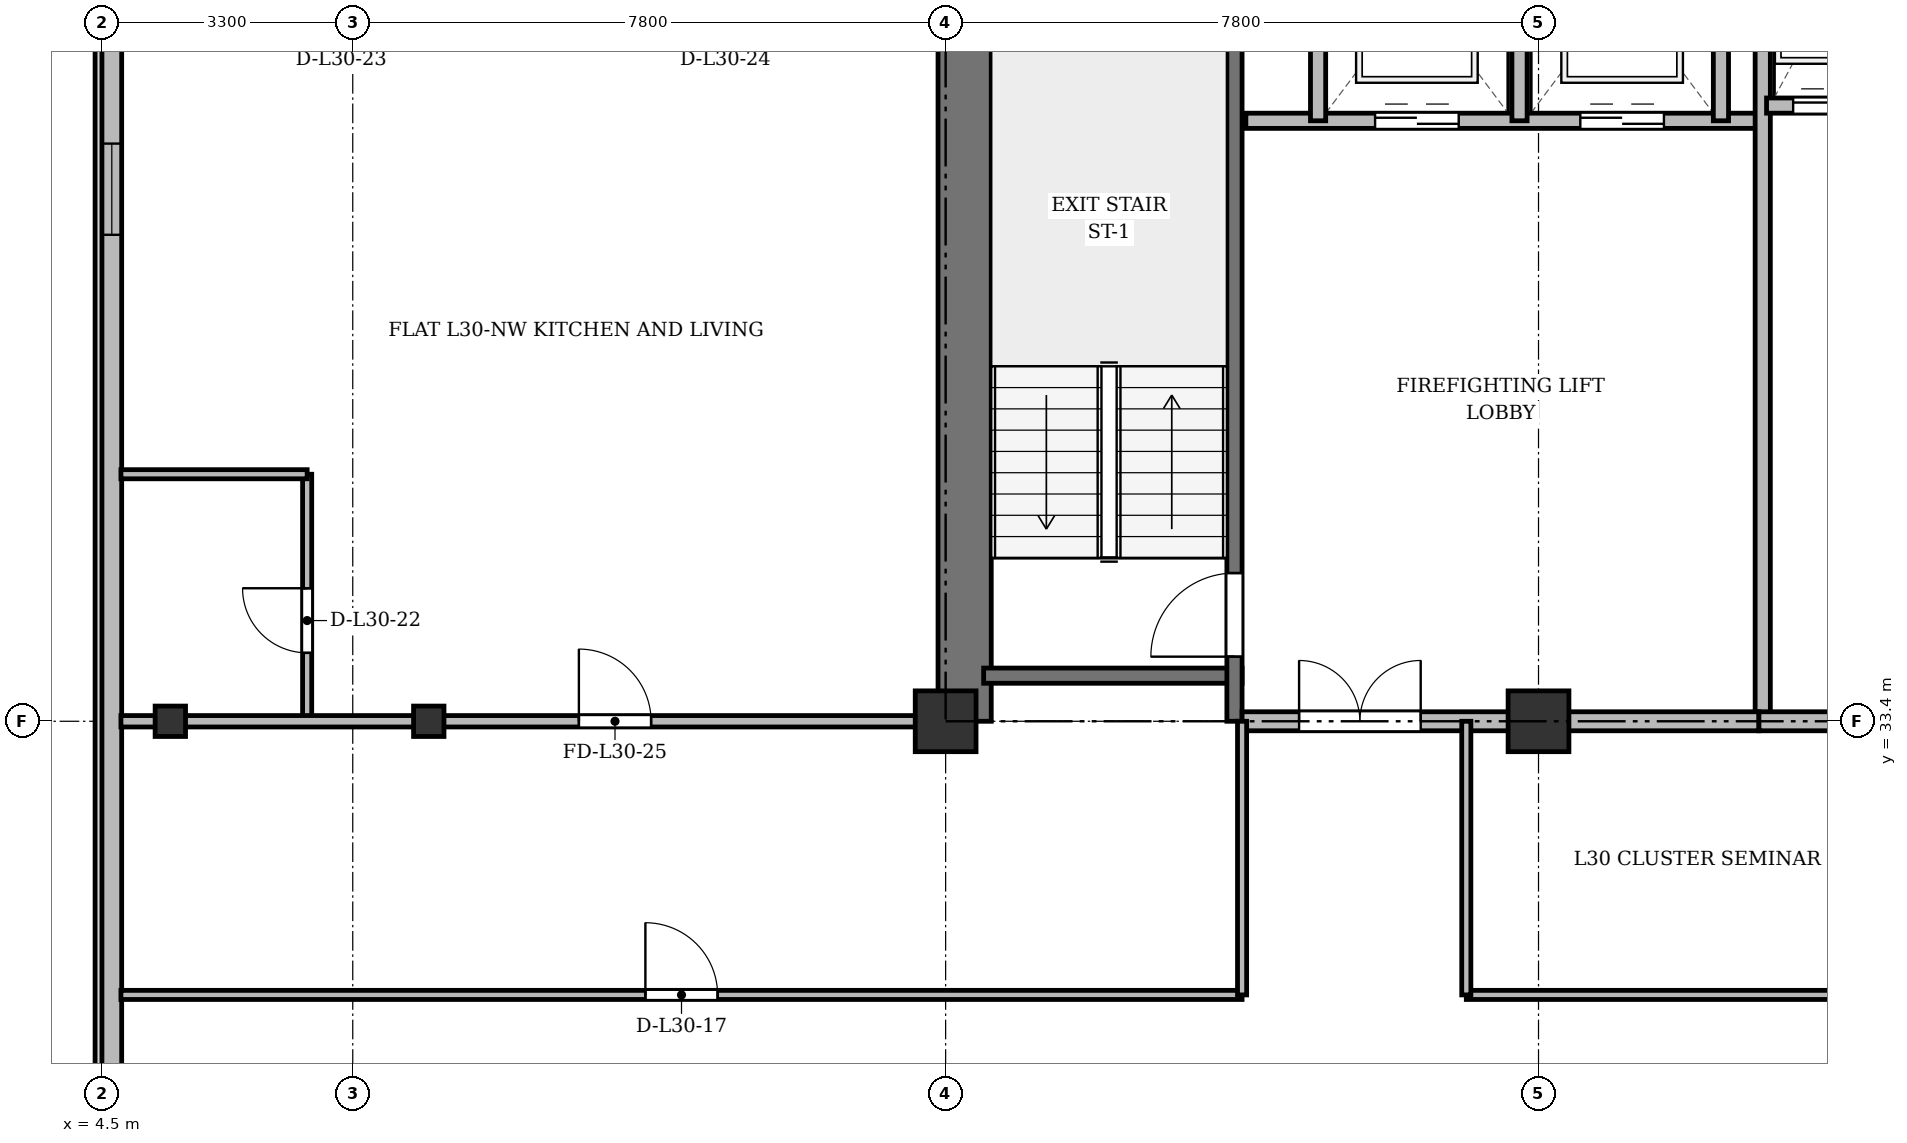
"""IFC4 building model, lengths in metres.
Left out: names, types, materials, properties, quantities, classifications, styles, units other than length and angle.
Written with IfcOpenShell. Run it as: python <this file> out.ifc"""

import sys

from ifc_helpers import new_model, si_unit, direction, frame, frame_2d, origin, origin_2d, place, context, subcontext, project, spatial, rectangle, i_section, extrude, source, transform, mapped, element, fill, save


model = new_model("IFC4")
c1 = context("Model", 3, precision=1e-05, world=origin(), true_north=direction((0.0, 1.0)))
c2 = subcontext(c1, "Body", "Model", "MODEL_VIEW")
j1 = project(units=[si_unit("LENGTHUNIT", "METRE"), si_unit("PLANEANGLEUNIT", "RADIAN")], contexts=[c1])
p1 = place(None, origin())
s1 = spatial("IfcSite", under=j1, at=p1, CompositionType="ELEMENT")
p2 = place(p1, origin())
s2 = spatial("IfcBuilding", under=s1, at=p2, CompositionType="ELEMENT")
p3 = place(p2, frame((0.0, 0.0, 117.7)))
s3 = spatial("IfcBuildingStorey", under=s2, at=p3, CompositionType="ELEMENT", Elevation=117.7)
m1 = source(origin(), c2, "Body", "SweptSolid", [
    extrude(i_section(OverallWidth=0.4, OverallDepth=0.4, WebThickness=0.022, FlangeThickness=0.035, at=origin_2d()), origin(), (0.0, 0.0, 1.0), 3.6),
])
for number, where, z_axis, x_axis in (
    (1, (5.4, 33.4, 0.0), (0.0, 0.0, 1.0), (1.0, 0.0, 0.0)),
    (2, (8.8, 33.4, 0.0), (0.0, 0.0, 1.0), (1.0, 0.0, 0.0)),
):
    element("IfcColumn", number, at=place(p3, frame(where, z_axis=z_axis, x_axis=x_axis)), inside=s3, PredefinedType="COLUMN", context=c2, shape_type="MappedRepresentation", body=[
        mapped(m1, transform((0.0, 0.0, 0.0), x_axis=(1.0, 0.0, 0.0), y_axis=(0.0, 1.0, 0.0), z_axis=(0.0, 0.0, 1.0), scale=1.0)),
    ])
m2 = source(origin(), c2, "Body", "SweptSolid", [
    extrude(rectangle(XDim=0.8, YDim=0.8, at=origin_2d()), origin(), (0.0, 0.0, 1.0), 3.6),
])
for number, where, z_axis, x_axis in (
    (3, (15.6, 33.4, 0.0), (0.0, 0.0, 1.0), (1.0, 0.0, 0.0)),
    (4, (23.4, 33.4, 0.0), (0.0, 0.0, 1.0), (1.0, 0.0, 0.0)),
):
    element("IfcColumn", number, at=place(p3, frame(where, z_axis=z_axis, x_axis=x_axis)), inside=s3, PredefinedType="COLUMN", context=c2, shape_type="MappedRepresentation", body=[
        mapped(m2, transform((0.0, 0.0, 0.0), x_axis=(1.0, 0.0, 0.0), y_axis=(0.0, 1.0, 0.0), z_axis=(0.0, 0.0, 1.0), scale=1.0)),
    ])
p4 = place(p3, frame((4.63, 5.9, 0.0), z_axis=(0.0, 0.0, 1.0), x_axis=(0.0, 1.0, 0.0)))
e5 = element("IfcWall", 5, at=p4, inside=s3, PredefinedType="SOLIDWALL", context=c2, shape_type="SweptSolid", body=[
    extrude(rectangle(XDim=39.6, YDim=0.26, at=frame_2d((19.8, 0.0))), origin(), (0.0, 0.0, 1.0), 3.34),
])
p5 = place(p4, frame((1.45, 0.0, 0.92)))
e6 = element("IfcOpeningElement", 6, at=p5, cuts=e5, PredefinedType="OPENING", context=c2, shape_type="SweptSolid", body=[
    extrude(rectangle(XDim=1.2, YDim=1.65, at=frame_2d((0.6, 0.825))), frame((0.0, 0.14, 0.0), z_axis=(0.0, -1.0, 0.0), x_axis=(1.0, 0.0, 0.0)), (0.0, 0.0, 1.0), 0.28),
])
p6 = place(p4, frame((4.2, 0.0, 0.92)))
e7 = element("IfcOpeningElement", 7, at=p6, cuts=e5, PredefinedType="OPENING", context=c2, shape_type="SweptSolid", body=[
    extrude(rectangle(XDim=2.6, YDim=1.9, at=frame_2d((1.3, 0.95))), frame((0.0, 0.14, 0.0), z_axis=(0.0, -1.0, 0.0), x_axis=(1.0, 0.0, 0.0)), (0.0, 0.0, 1.0), 0.28),
])
p7 = place(p4, frame((8.4, 0.0, 0.92)))
e8 = element("IfcOpeningElement", 8, at=p7, cuts=e5, PredefinedType="OPENING", context=c2, shape_type="SweptSolid", body=[
    extrude(rectangle(XDim=2.6, YDim=1.9, at=frame_2d((1.3, 0.95))), frame((0.0, 0.14, 0.0), z_axis=(0.0, -1.0, 0.0), x_axis=(1.0, 0.0, 0.0)), (0.0, 0.0, 1.0), 0.28),
])
p8 = place(p4, frame((15.6, 0.0, 0.92)))
e9 = element("IfcOpeningElement", 9, at=p8, cuts=e5, PredefinedType="OPENING", context=c2, shape_type="SweptSolid", body=[
    extrude(rectangle(XDim=2.6, YDim=1.9, at=frame_2d((1.3, 0.95))), frame((0.0, 0.14, 0.0), z_axis=(0.0, -1.0, 0.0), x_axis=(1.0, 0.0, 0.0)), (0.0, 0.0, 1.0), 0.28),
])
p9 = place(p4, frame((33.9, 0.0, 0.92)))
e10 = element("IfcOpeningElement", 10, at=p9, cuts=e5, PredefinedType="OPENING", context=c2, shape_type="SweptSolid", body=[
    extrude(rectangle(XDim=1.2, YDim=1.65, at=frame_2d((0.6, 0.825))), frame((0.0, 0.14, 0.0), z_axis=(0.0, -1.0, 0.0), x_axis=(1.0, 0.0, 0.0)), (0.0, 0.0, 1.0), 0.28),
])
p10 = place(p4, frame((37.25, 0.0, 0.92)))
e11 = element("IfcOpeningElement", 11, at=p10, cuts=e5, PredefinedType="OPENING", context=c2, shape_type="SweptSolid", body=[
    extrude(rectangle(XDim=1.2, YDim=1.65, at=frame_2d((0.6, 0.825))), frame((0.0, 0.14, 0.0), z_axis=(0.0, -1.0, 0.0), x_axis=(1.0, 0.0, 0.0)), (0.0, 0.0, 1.0), 0.28),
])
p11 = place(p3, frame((15.85, 33.4, 0.0), z_axis=(0.0, 0.0, 1.0), x_axis=(0.0, 1.0, 0.0)))
e12 = element("IfcWall", 12, at=p11, inside=s3, PredefinedType="SHEAR", context=c2, shape_type="SweptSolid", body=[
    extrude(rectangle(XDim=11.7, YDim=0.7, at=frame_2d((5.85, 0.0))), origin(), (0.0, 0.0, 1.0), 3.34),
])
p12 = place(p3, frame((16.1, 34.0, 0.0), z_axis=(0.0, 0.0, 1.0), x_axis=(1.0, 0.0, 0.0)))
e13 = element("IfcWall", 13, at=p12, inside=s3, PredefinedType="SHEAR", context=c2, shape_type="SweptSolid", body=[
    extrude(rectangle(XDim=3.4, YDim=0.2, at=frame_2d((1.7, 0.0))), origin(), (0.0, 0.0, 1.0), 3.34),
])
p13 = place(p3, frame((19.4, 33.4, 0.0), z_axis=(0.0, 0.0, 1.0), x_axis=(0.0, 1.0, 0.0)))
e14 = element("IfcWall", 14, at=p13, inside=s3, PredefinedType="SHEAR", context=c2, shape_type="SweptSolid", body=[
    extrude(rectangle(XDim=11.1, YDim=0.2, at=frame_2d((5.55, 0.0))), origin(), (0.0, 0.0, 1.0), 3.34),
])
p14 = place(p13, frame((0.85, 0.0, 0.0)))
e15 = element("IfcOpeningElement", 15, at=p14, cuts=e14, PredefinedType="OPENING", context=c2, shape_type="SweptSolid", body=[
    extrude(rectangle(XDim=1.1, YDim=2.15, at=frame_2d((0.55, 1.075))), frame((0.0, 0.11, 0.0), z_axis=(0.0, -1.0, 0.0), x_axis=(1.0, 0.0, 0.0)), (0.0, 0.0, 1.0), 0.22),
])
p15 = place(p3, frame((19.55, 41.3, 0.0), z_axis=(0.0, 0.0, 1.0), x_axis=(1.0, 0.0, 0.0)))
e16 = element("IfcWall", 16, at=p15, inside=s3, PredefinedType="SOLIDWALL", context=c2, shape_type="SweptSolid", body=[
    extrude(rectangle(XDim=6.75, YDim=0.2, at=frame_2d((3.375, 0.0))), origin(), (0.0, 0.0, 1.0), 3.34),
])
p16 = place(p15, frame((1.7, 0.0, 0.0)))
e17 = element("IfcOpeningElement", 17, at=p16, cuts=e16, PredefinedType="OPENING", context=c2, shape_type="SweptSolid", body=[
    extrude(rectangle(XDim=1.1, YDim=2.15, at=frame_2d((0.55, 1.075))), frame((0.0, 0.11, 0.0), z_axis=(0.0, -1.0, 0.0), x_axis=(1.0, 0.0, 0.0)), (0.0, 0.0, 1.0), 0.22),
])
p17 = place(p15, frame((4.4, 0.0, 0.0)))
e18 = element("IfcOpeningElement", 18, at=p17, cuts=e16, PredefinedType="OPENING", context=c2, shape_type="SweptSolid", body=[
    extrude(rectangle(XDim=1.1, YDim=2.15, at=frame_2d((0.55, 1.075))), frame((0.0, 0.11, 0.0), z_axis=(0.0, -1.0, 0.0), x_axis=(1.0, 0.0, 0.0)), (0.0, 0.0, 1.0), 0.22),
])
for number, where, z_axis, x_axis in (
    (19, (20.5, 41.3, 0.0), (0.0, 0.0, 1.0), (0.0, 1.0, 0.0)),
    (20, (23.15, 41.3, 0.0), (0.0, 0.0, 1.0), (0.0, 1.0, 0.0)),
    (21, (25.8, 41.3, 0.0), (0.0, 0.0, 1.0), (0.0, 1.0, 0.0)),
):
    element("IfcWall", number, at=place(p3, frame(where, z_axis=z_axis, x_axis=x_axis)), inside=s3, PredefinedType="SOLIDWALL", context=c2, shape_type="SweptSolid", body=[
        extrude(rectangle(XDim=3.4, YDim=0.2, at=frame_2d((1.7, 0.0))), origin(), (0.0, 0.0, 1.0), 3.34),
    ])
p18 = place(p3, frame((26.35, 33.4, 0.0), z_axis=(0.0, 0.0, 1.0), x_axis=(0.0, 1.0, 0.0)))
e22 = element("IfcWall", 22, at=p18, inside=s3, PredefinedType="SOLIDWALL", context=c2, shape_type="SweptSolid", body=[
    extrude(rectangle(XDim=11.3, YDim=0.2, at=frame_2d((5.65, 0.0))), origin(), (0.0, 0.0, 1.0), 2.752),
])
p19 = place(p3, frame((19.5, 33.4, 0.0), z_axis=(0.0, 0.0, 1.0), x_axis=(1.0, 0.0, 0.0)))
e23 = element("IfcWall", 23, at=p19, inside=s3, PredefinedType="PARTITIONING", context=c2, shape_type="SweptSolid", body=[
    extrude(rectangle(XDim=6.8, YDim=0.25, at=frame_2d((3.4, 0.0))), origin(), (0.0, 0.0, 1.0), 2.752),
])
p20 = place(p19, frame((0.75, 0.0, 0.0)))
e24 = element("IfcOpeningElement", 24, at=p20, cuts=e23, PredefinedType="OPENING", context=c2, shape_type="SweptSolid", body=[
    extrude(rectangle(XDim=1.6, YDim=2.2, at=frame_2d((0.8, 1.1))), frame((0.0, 0.135, 0.0), z_axis=(0.0, -1.0, 0.0), x_axis=(1.0, 0.0, 0.0)), (0.0, 0.0, 1.0), 0.27),
])
p21 = place(p3, frame((26.4, 41.5, 0.0), z_axis=(0.0, 0.0, 1.0), x_axis=(1.0, 0.0, 0.0)))
e25 = element("IfcWall", 25, at=p21, inside=s3, PredefinedType="SOLIDWALL", context=c2, shape_type="SweptSolid", body=[
    extrude(rectangle(XDim=6.95, YDim=0.2, at=frame_2d((3.475, 0.0))), origin(), (0.0, 0.0, 1.0), 3.34),
])
p22 = place(p21, frame((0.35, 0.0, 0.0)))
e26 = element("IfcOpeningElement", 26, at=p22, cuts=e25, PredefinedType="OPENING", context=c2, shape_type="SweptSolid", body=[
    extrude(rectangle(XDim=1.05, YDim=2.15, at=frame_2d((0.525, 1.075))), frame((0.0, 0.11, 0.0), z_axis=(0.0, -1.0, 0.0), x_axis=(1.0, 0.0, 0.0)), (0.0, 0.0, 1.0), 0.22),
])
p23 = place(p21, frame((2.05, 0.0, 0.0)))
e27 = element("IfcOpeningElement", 27, at=p23, cuts=e25, PredefinedType="OPENING", context=c2, shape_type="SweptSolid", body=[
    extrude(rectangle(XDim=1.05, YDim=2.15, at=frame_2d((0.525, 1.075))), frame((0.0, 0.11, 0.0), z_axis=(0.0, -1.0, 0.0), x_axis=(1.0, 0.0, 0.0)), (0.0, 0.0, 1.0), 0.22),
])
p24 = place(p21, frame((3.75, 0.0, 0.0)))
e28 = element("IfcOpeningElement", 28, at=p24, cuts=e25, PredefinedType="OPENING", context=c2, shape_type="SweptSolid", body=[
    extrude(rectangle(XDim=1.05, YDim=2.15, at=frame_2d((0.525, 1.075))), frame((0.0, 0.11, 0.0), z_axis=(0.0, -1.0, 0.0), x_axis=(1.0, 0.0, 0.0)), (0.0, 0.0, 1.0), 0.22),
])
p25 = place(p21, frame((5.45, 0.0, 0.0)))
e29 = element("IfcOpeningElement", 29, at=p25, cuts=e25, PredefinedType="OPENING", context=c2, shape_type="SweptSolid", body=[
    extrude(rectangle(XDim=1.05, YDim=2.15, at=frame_2d((0.525, 1.075))), frame((0.0, 0.11, 0.0), z_axis=(0.0, -1.0, 0.0), x_axis=(1.0, 0.0, 0.0)), (0.0, 0.0, 1.0), 0.22),
])
p26 = place(p3, frame((26.3, 33.4, 0.0), z_axis=(0.0, 0.0, 1.0), x_axis=(1.0, 0.0, 0.0)))
e30 = element("IfcWall", 30, at=p26, inside=s3, PredefinedType="PARTITIONING", context=c2, shape_type="SweptSolid", body=[
    extrude(rectangle(XDim=20.85, YDim=0.25, at=frame_2d((10.425, 0.0))), origin(), (0.0, 0.0, 1.0), 2.752),
])
p27 = place(p26, frame((9.2, 0.0, 0.0)))
e31 = element("IfcOpeningElement", 31, at=p27, cuts=e30, PredefinedType="OPENING", context=c2, shape_type="SweptSolid", body=[
    extrude(rectangle(XDim=1.6, YDim=2.2, at=frame_2d((0.8, 1.1))), frame((0.0, 0.135, 0.0), z_axis=(0.0, -1.0, 0.0), x_axis=(1.0, 0.0, 0.0)), (0.0, 0.0, 1.0), 0.27),
])
p28 = place(p3, frame((4.75, 29.8, 0.0), z_axis=(0.0, 0.0, 1.0), x_axis=(1.0, 0.0, 0.0)))
e32 = element("IfcWall", 32, at=p28, inside=s3, PredefinedType="PARTITIONING", context=c2, shape_type="SweptSolid", body=[
    extrude(rectangle(XDim=14.75, YDim=0.12, at=frame_2d((7.375, 0.0))), origin(), (0.0, 0.0, 1.0), 2.84),
])
p29 = place(p28, frame((6.9, 0.0, 0.0)))
e33 = element("IfcOpeningElement", 33, at=p29, cuts=e32, PredefinedType="OPENING", context=c2, shape_type="SweptSolid", body=[
    extrude(rectangle(XDim=0.95, YDim=2.15, at=frame_2d((0.475, 1.075))), frame((0.0, 0.07, 0.0), z_axis=(0.0, -1.0, 0.0), x_axis=(1.0, 0.0, 0.0)), (0.0, 0.0, 1.0), 0.14),
])
p30 = place(p3, frame((22.45, 29.8, 0.0), z_axis=(0.0, 0.0, 1.0), x_axis=(1.0, 0.0, 0.0)))
e34 = element("IfcWall", 34, at=p30, inside=s3, PredefinedType="PARTITIONING", context=c2, shape_type="SweptSolid", body=[
    extrude(rectangle(XDim=11.75, YDim=0.12, at=frame_2d((5.875, 0.0))), origin(), (0.0, 0.0, 1.0), 2.84),
])
p31 = place(p30, frame((4.944, 0.0, 0.0)))
e35 = element("IfcOpeningElement", 35, at=p31, cuts=e34, PredefinedType="OPENING", context=c2, shape_type="SweptSolid", body=[
    extrude(rectangle(XDim=0.95, YDim=2.15, at=frame_2d((0.475, 1.075))), frame((0.0, 0.07, 0.0), z_axis=(0.0, -1.0, 0.0), x_axis=(1.0, 0.0, 0.0)), (0.0, 0.0, 1.0), 0.14),
])
for number, where, z_axis, x_axis in (
    (36, (19.5, 29.8, 0.0), (0.0, 0.0, 1.0), (0.0, 1.0, 0.0)),
    (37, (22.45, 29.8, 0.0), (0.0, 0.0, 1.0), (0.0, 1.0, 0.0)),
):
    element("IfcWall", number, at=place(p3, frame(where, z_axis=z_axis, x_axis=x_axis)), inside=s3, PredefinedType="PARTITIONING", context=c2, shape_type="SweptSolid", body=[
        extrude(rectangle(XDim=3.6, YDim=0.12, at=frame_2d((1.8, 0.0))), origin(), (0.0, 0.0, 1.0), 2.752),
    ])
p32 = place(p3, frame((7.2, 33.4, 0.0), z_axis=(0.0, 0.0, 1.0), x_axis=(0.0, 1.0, 0.0)))
e38 = element("IfcWall", 38, at=p32, inside=s3, PredefinedType="PARTITIONING", context=c2, shape_type="SweptSolid", body=[
    extrude(rectangle(XDim=3.25, YDim=0.12, at=frame_2d((1.625, 0.0))), origin(), (0.0, 0.0, 1.0), 2.752),
])
p33 = place(p32, frame((0.9, 0.0, 0.0)))
e39 = element("IfcOpeningElement", 39, at=p33, cuts=e38, PredefinedType="OPENING", context=c2, shape_type="SweptSolid", body=[
    extrude(rectangle(XDim=0.85, YDim=2.1, at=frame_2d((0.425, 1.05))), frame((0.0, 0.07, 0.0), z_axis=(0.0, -1.0, 0.0), x_axis=(1.0, 0.0, 0.0)), (0.0, 0.0, 1.0), 0.14),
])
p34 = place(p3, frame((4.75, 36.65, 0.0), z_axis=(0.0, 0.0, 1.0), x_axis=(1.0, 0.0, 0.0)))
e40 = element("IfcWall", 40, at=p34, inside=s3, PredefinedType="PARTITIONING", context=c2, shape_type="SweptSolid", body=[
    extrude(rectangle(XDim=2.45, YDim=0.12, at=frame_2d((1.225, 0.0))), origin(), (0.0, 0.0, 1.0), 2.84),
])
p35 = place(p3, frame((4.75, 33.4, 0.0), z_axis=(0.0, 0.0, 1.0), x_axis=(1.0, 0.0, 0.0)))
e41 = element("IfcWall", 41, at=p35, inside=s3, PredefinedType="PARTITIONING", context=c2, shape_type="SweptSolid", body=[
    extrude(rectangle(XDim=10.85, YDim=0.15, at=frame_2d((5.425, 0.0))), origin(), (0.0, 0.0, 1.0), 2.752),
])
p36 = place(p35, frame((6.025, 0.0, 0.0)))
e42 = element("IfcOpeningElement", 42, at=p36, cuts=e41, PredefinedType="OPENING", context=c2, shape_type="SweptSolid", body=[
    extrude(rectangle(XDim=0.95, YDim=2.15, at=frame_2d((0.475, 1.075))), frame((0.0, 0.085, 0.0), z_axis=(0.0, -1.0, 0.0), x_axis=(1.0, 0.0, 0.0)), (0.0, 0.0, 1.0), 0.17),
])
m3 = source(origin(), c2, "Body", "SweptSolid", [
    extrude(rectangle(XDim=1.2, YDim=1.65, at=frame_2d((0.6, 0.825))), frame((0.0, 0.03, 0.0), z_axis=(0.0, -1.0, 0.0), x_axis=(1.0, 0.0, 0.0)), (0.0, 0.0, 1.0), 0.06),
])
p37 = place(p9, origin())
e43 = element("IfcWindow", 43, at=p37, inside=s3, PartitioningType="SINGLE_PANEL", PredefinedType="WINDOW", context=c2, shape_type="MappedRepresentation", body=[
    mapped(m3, transform((0.0, 0.0, 0.0), x_axis=(1.0, 0.0, 0.0), y_axis=(0.0, 1.0, 0.0), z_axis=(0.0, 0.0, 1.0), scale=1.0)),
])
fill(e10, e43)
m4 = source(origin(), c2, "Body", "SweptSolid", [
    extrude(rectangle(XDim=1.1, YDim=2.15, at=frame_2d((0.55, 1.075))), frame((0.0, 0.025, 0.0), z_axis=(0.0, -1.0, 0.0), x_axis=(1.0, 0.0, 0.0)), (0.0, 0.0, 1.0), 0.05),
])
p38 = place(p14, origin())
e44 = element("IfcDoor", 44, at=p38, inside=s3, OperationType="SINGLE_SWING_LEFT", PredefinedType="DOOR", context=c2, shape_type="MappedRepresentation", body=[
    mapped(m4, transform((0.0, 0.0, 0.0), x_axis=(1.0, 0.0, 0.0), y_axis=(0.0, 1.0, 0.0), z_axis=(0.0, 0.0, 1.0), scale=1.0)),
])
fill(e15, e44)
p39 = place(p16, origin())
e45 = element("IfcDoor", 45, at=p39, inside=s3, OperationType="DOUBLE_DOOR_SLIDING", PredefinedType="DOOR", context=c2, shape_type="MappedRepresentation", body=[
    mapped(m4, transform((0.0, 0.0, 0.0), x_axis=(1.0, 0.0, 0.0), y_axis=(0.0, 1.0, 0.0), z_axis=(0.0, 0.0, 1.0), scale=1.0)),
])
fill(e17, e45)
p40 = place(p17, origin())
e46 = element("IfcDoor", 46, at=p40, inside=s3, OperationType="DOUBLE_DOOR_SLIDING", PredefinedType="DOOR", context=c2, shape_type="MappedRepresentation", body=[
    mapped(m4, transform((0.0, 0.0, 0.0), x_axis=(1.0, 0.0, 0.0), y_axis=(0.0, 1.0, 0.0), z_axis=(0.0, 0.0, 1.0), scale=1.0)),
])
fill(e18, e46)
m5 = source(origin(), c2, "Body", "SweptSolid", [
    extrude(rectangle(XDim=1.6, YDim=2.2, at=frame_2d((0.8, 1.1))), frame((0.0, 0.025, 0.0), z_axis=(0.0, -1.0, 0.0), x_axis=(1.0, 0.0, 0.0)), (0.0, 0.0, 1.0), 0.05),
])
p41 = place(p20, origin())
e47 = element("IfcDoor", 47, at=p41, inside=s3, OperationType="DOUBLE_DOOR_SINGLE_SWING", PredefinedType="DOOR", context=c2, shape_type="MappedRepresentation", body=[
    mapped(m5, transform((0.0, 0.0, 0.0), x_axis=(1.0, 0.0, 0.0), y_axis=(0.0, 1.0, 0.0), z_axis=(0.0, 0.0, 1.0), scale=1.0)),
])
fill(e24, e47)
m6 = source(origin(), c2, "Body", "SweptSolid", [
    extrude(rectangle(XDim=1.05, YDim=2.15, at=frame_2d((0.525, 1.075))), frame((0.0, 0.025, 0.0), z_axis=(0.0, -1.0, 0.0), x_axis=(1.0, 0.0, 0.0)), (0.0, 0.0, 1.0), 0.05),
])
p42 = place(p22, origin())
e48 = element("IfcDoor", 48, at=p42, inside=s3, OperationType="DOUBLE_DOOR_SLIDING", PredefinedType="DOOR", context=c2, shape_type="MappedRepresentation", body=[
    mapped(m6, transform((0.0, 0.0, 0.0), x_axis=(1.0, 0.0, 0.0), y_axis=(0.0, 1.0, 0.0), z_axis=(0.0, 0.0, 1.0), scale=1.0)),
])
fill(e26, e48)
m7 = source(origin(), c2, "Body", "SweptSolid", [
    extrude(rectangle(XDim=0.95, YDim=2.15, at=frame_2d((0.475, 1.075))), frame((0.0, 0.025, 0.0), z_axis=(0.0, -1.0, 0.0), x_axis=(1.0, 0.0, 0.0)), (0.0, 0.0, 1.0), 0.05),
])
p43 = place(p29, origin())
e49 = element("IfcDoor", 49, at=p43, inside=s3, OperationType="SINGLE_SWING_LEFT", PredefinedType="DOOR", context=c2, shape_type="MappedRepresentation", body=[
    mapped(m7, transform((0.0, 0.0, 0.0), x_axis=(1.0, 0.0, 0.0), y_axis=(0.0, 1.0, 0.0), z_axis=(0.0, 0.0, 1.0), scale=1.0)),
])
fill(e33, e49)
m8 = source(origin(), c2, "Body", "SweptSolid", [
    extrude(rectangle(XDim=0.85, YDim=2.1, at=frame_2d((0.425, 1.05))), frame((0.0, 0.025, 0.0), z_axis=(0.0, -1.0, 0.0), x_axis=(1.0, 0.0, 0.0)), (0.0, 0.0, 1.0), 0.05),
])
p44 = place(p33, origin())
e50 = element("IfcDoor", 50, at=p44, inside=s3, OperationType="SINGLE_SWING_RIGHT", PredefinedType="DOOR", context=c2, shape_type="MappedRepresentation", body=[
    mapped(m8, transform((0.0, 0.0, 0.0), x_axis=(1.0, 0.0, 0.0), y_axis=(0.0, 1.0, 0.0), z_axis=(0.0, 0.0, 1.0), scale=1.0)),
])
fill(e39, e50)
p45 = place(p36, origin())
e51 = element("IfcDoor", 51, at=p45, inside=s3, OperationType="SINGLE_SWING_LEFT", PredefinedType="DOOR", context=c2, shape_type="MappedRepresentation", body=[
    mapped(m7, transform((0.0, 0.0, 0.0), x_axis=(1.0, 0.0, 0.0), y_axis=(0.0, 1.0, 0.0), z_axis=(0.0, 0.0, 1.0), scale=1.0)),
])
fill(e42, e51)
save(model, sys.argv[1])
